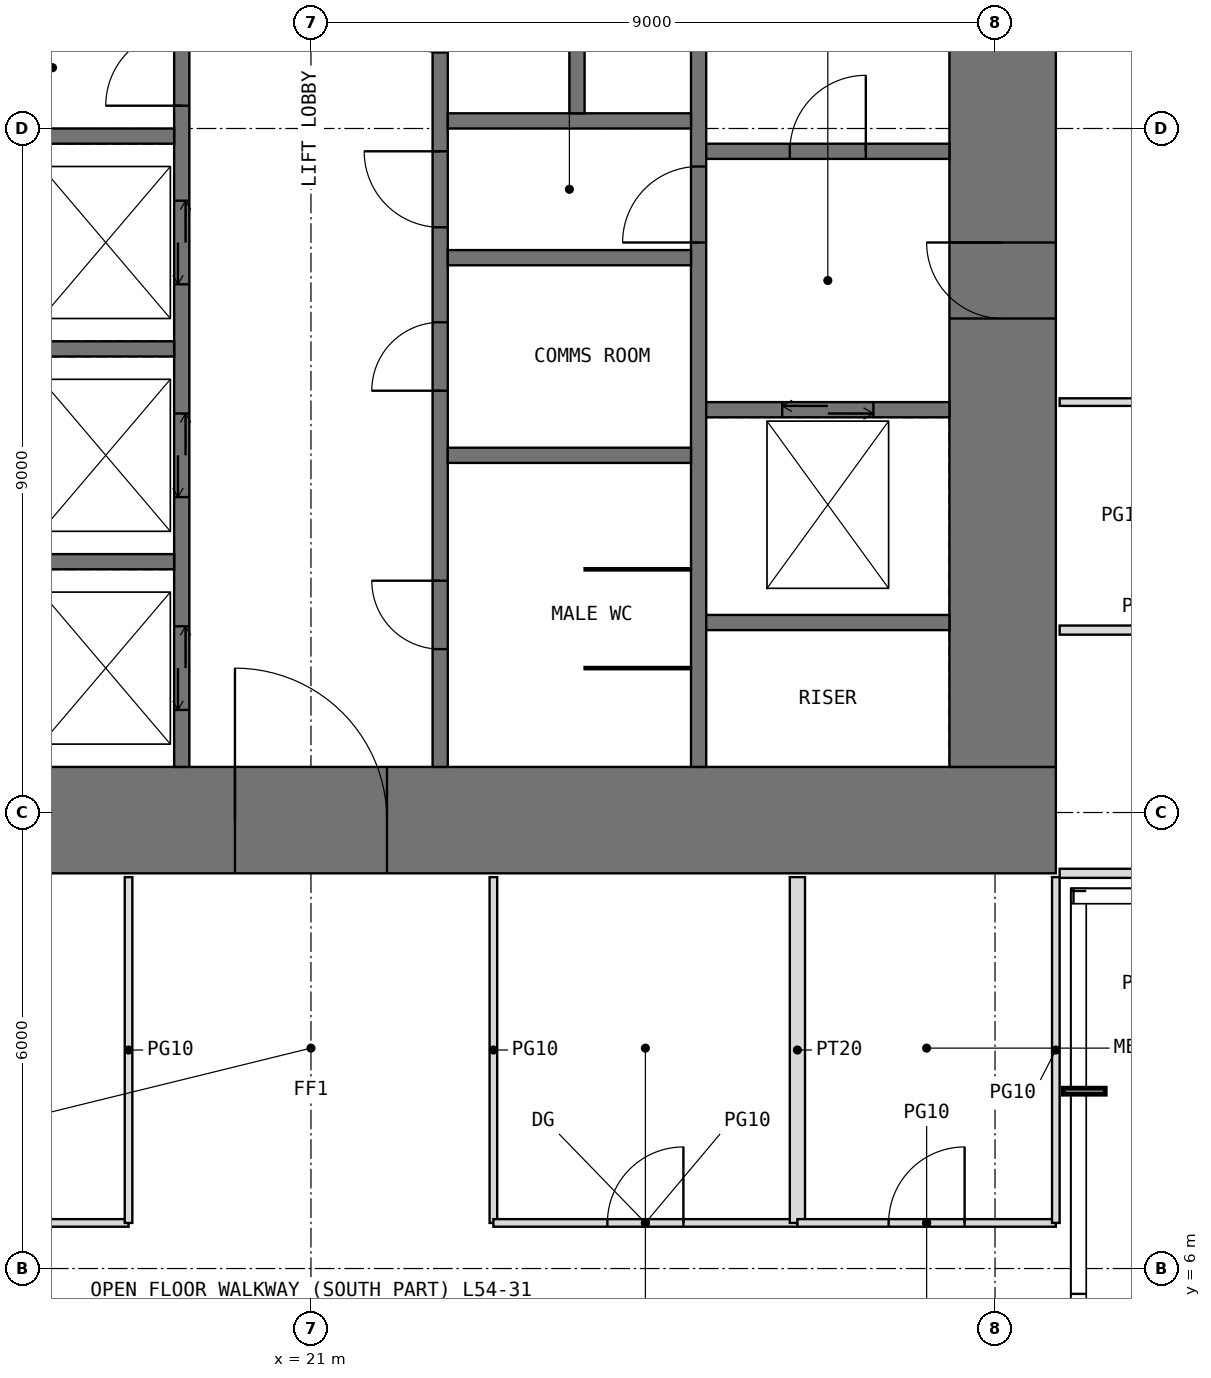
"""IFC4 building model, lengths in metres.
Left out: names, types, materials, properties, quantities, classifications, styles, units other than length and angle.
Written with IfcOpenShell. Run it as: python <this file> out.ifc"""

import sys

from ifc_helpers import new_model, si_unit, direction, frame, frame_2d, origin, place, context, subcontext, project, spatial, rectangle, extrude, element, fill, save


model = new_model("IFC4")
c1 = context("Model", 3, precision=1e-05, world=origin(), true_north=direction((0.0, 1.0)))
c2 = subcontext(c1, "Body", "Model", "MODEL_VIEW")
j1 = project(units=[si_unit("LENGTHUNIT", "METRE"), si_unit("PLANEANGLEUNIT", "RADIAN")], contexts=[c1])
p1 = place(None, origin())
s1 = spatial("IfcSite", under=j1, at=p1, CompositionType="ELEMENT")
p2 = place(p1, origin())
s2 = spatial("IfcBuilding", under=s1, at=p2, CompositionType="ELEMENT")
p3 = place(p2, frame((0.0, 0.0, 226.5)))
s3 = spatial("IfcBuildingStorey", under=s2, at=p3, CompositionType="ELEMENT", Elevation=226.5)
p4 = place(p3, frame((11.2, 11.9, -0.05), z_axis=(0.0, 0.0, 1.0), x_axis=(1.0, 0.0, 0.0)))
e1 = element("IfcWall", 1, at=p4, inside=s3, PredefinedType="SHEAR", context=c2, shape_type="SweptSolid", body=[
    extrude(rectangle(XDim=19.6, YDim=1.4, at=frame_2d((9.8, 0.0))), origin(), (0.0, 0.0, 1.0), 4.0),
])
p5 = place(p4, frame((8.8, 0.0, 0.05)))
e2 = element("IfcOpeningElement", 2, at=p5, cuts=e1, PredefinedType="OPENING", context=c2, shape_type="SweptSolid", body=[
    extrude(rectangle(XDim=2.0, YDim=2.2, at=frame_2d((1.0, 1.1))), frame((0.0, 0.71, 0.0), z_axis=(0.0, -1.0, 0.0), x_axis=(1.0, 0.0, 0.0)), (0.0, 0.0, 1.0), 1.42),
])
p6 = place(p3, frame((30.1, 12.6, -0.05), z_axis=(0.0, 0.0, 1.0), x_axis=(0.0, 1.0, 0.0)))
e3 = element("IfcWall", 3, at=p6, inside=s3, PredefinedType="SHEAR", context=c2, shape_type="SweptSolid", body=[
    extrude(rectangle(XDim=16.8, YDim=1.4, at=frame_2d((8.4, 0.0))), origin(), (0.0, 0.0, 1.0), 4.0),
])
p7 = place(p6, frame((5.9, 0.0, 0.05)))
e4 = element("IfcOpeningElement", 4, at=p7, cuts=e3, PredefinedType="OPENING", context=c2, shape_type="SweptSolid", body=[
    extrude(rectangle(XDim=1.0, YDim=2.2, at=frame_2d((0.5, 1.1))), frame((0.0, 0.71, 0.0), z_axis=(0.0, -1.0, 0.0), x_axis=(1.0, 0.0, 0.0)), (0.0, 0.0, 1.0), 1.42),
])
p8 = place(p3, frame((19.3, 12.6, -0.05), z_axis=(0.0, 0.0, 1.0), x_axis=(0.0, 1.0, 0.0)))
e5 = element("IfcWall", 5, at=p8, inside=s3, PredefinedType="SHEAR", context=c2, shape_type="SweptSolid", body=[
    extrude(rectangle(XDim=16.8, YDim=0.2, at=frame_2d((8.4, 0.0))), origin(), (0.0, 0.0, 1.0), 4.0),
])
p9 = place(p8, frame((8.7, 0.0, 0.05)))
e6 = element("IfcOpeningElement", 6, at=p9, cuts=e5, PredefinedType="OPENING", context=c2, shape_type="SweptSolid", body=[
    extrude(rectangle(XDim=1.0, YDim=2.2, at=frame_2d((0.5, 1.1))), frame((0.0, 0.11, 0.0), z_axis=(0.0, -1.0, 0.0), x_axis=(1.0, 0.0, 0.0)), (0.0, 0.0, 1.0), 0.22),
])
p10 = place(p8, frame((10.85, 0.0, 0.05)))
e7 = element("IfcOpeningElement", 7, at=p10, cuts=e5, PredefinedType="OPENING", context=c2, shape_type="SweptSolid", body=[
    extrude(rectangle(XDim=0.9, YDim=2.2, at=frame_2d((0.45, 1.1))), frame((0.0, 0.11, 0.0), z_axis=(0.0, -1.0, 0.0), x_axis=(1.0, 0.0, 0.0)), (0.0, 0.0, 1.0), 0.22),
])
p11 = place(p8, frame((13.3, 0.0, 0.05)))
e8 = element("IfcOpeningElement", 8, at=p11, cuts=e5, PredefinedType="OPENING", context=c2, shape_type="SweptSolid", body=[
    extrude(rectangle(XDim=1.0, YDim=2.2, at=frame_2d((0.5, 1.1))), frame((0.0, 0.11, 0.0), z_axis=(0.0, -1.0, 0.0), x_axis=(1.0, 0.0, 0.0)), (0.0, 0.0, 1.0), 0.22),
])
p12 = place(p8, frame((15.55, 0.0, 0.05)))
e9 = element("IfcOpeningElement", 9, at=p12, cuts=e5, PredefinedType="OPENING", context=c2, shape_type="SweptSolid", body=[
    extrude(rectangle(XDim=0.9, YDim=2.2, at=frame_2d((0.45, 1.1))), frame((0.0, 0.11, 0.0), z_axis=(0.0, -1.0, 0.0), x_axis=(1.0, 0.0, 0.0)), (0.0, 0.0, 1.0), 0.22),
])
p13 = place(p8, frame((0.75, 0.0, 0.05)))
e10 = element("IfcOpeningElement", 10, at=p13, cuts=e5, PredefinedType="OPENING", context=c2, shape_type="SweptSolid", body=[
    extrude(rectangle(XDim=1.1, YDim=2.2, at=frame_2d((0.55, 1.1))), frame((0.0, 0.11, 0.0), z_axis=(0.0, -1.0, 0.0), x_axis=(1.0, 0.0, 0.0)), (0.0, 0.0, 1.0), 0.22),
])
p14 = place(p8, frame((3.55, 0.0, 0.05)))
e11 = element("IfcOpeningElement", 11, at=p14, cuts=e5, PredefinedType="OPENING", context=c2, shape_type="SweptSolid", body=[
    extrude(rectangle(XDim=1.1, YDim=2.2, at=frame_2d((0.55, 1.1))), frame((0.0, 0.11, 0.0), z_axis=(0.0, -1.0, 0.0), x_axis=(1.0, 0.0, 0.0)), (0.0, 0.0, 1.0), 0.22),
])
p15 = place(p8, frame((6.35, 0.0, 0.05)))
e12 = element("IfcOpeningElement", 12, at=p15, cuts=e5, PredefinedType="OPENING", context=c2, shape_type="SweptSolid", body=[
    extrude(rectangle(XDim=1.1, YDim=2.2, at=frame_2d((0.55, 1.1))), frame((0.0, 0.11, 0.0), z_axis=(0.0, -1.0, 0.0), x_axis=(1.0, 0.0, 0.0)), (0.0, 0.0, 1.0), 0.22),
])
p16 = place(p3, frame((22.7, 12.6, -0.05), z_axis=(0.0, 0.0, 1.0), x_axis=(0.0, 1.0, 0.0)))
e13 = element("IfcWall", 13, at=p16, inside=s3, PredefinedType="SHEAR", context=c2, shape_type="SweptSolid", body=[
    extrude(rectangle(XDim=16.8, YDim=0.2, at=frame_2d((8.4, 0.0))), origin(), (0.0, 0.0, 1.0), 4.0),
])
p17 = place(p16, frame((7.1, 0.0, 0.05)))
e14 = element("IfcOpeningElement", 14, at=p17, cuts=e13, PredefinedType="OPENING", context=c2, shape_type="SweptSolid", body=[
    extrude(rectangle(XDim=1.0, YDim=2.2, at=frame_2d((0.5, 1.1))), frame((0.0, 0.11, 0.0), z_axis=(0.0, -1.0, 0.0), x_axis=(1.0, 0.0, 0.0)), (0.0, 0.0, 1.0), 0.22),
])
p18 = place(p16, frame((1.55, 0.0, 0.05)))
e15 = element("IfcOpeningElement", 15, at=p18, cuts=e13, PredefinedType="OPENING", context=c2, shape_type="SweptSolid", body=[
    extrude(rectangle(XDim=0.9, YDim=2.2, at=frame_2d((0.45, 1.1))), frame((0.0, 0.11, 0.0), z_axis=(0.0, -1.0, 0.0), x_axis=(1.0, 0.0, 0.0)), (0.0, 0.0, 1.0), 0.22),
])
p19 = place(p16, frame((4.95, 0.0, 0.05)))
e16 = element("IfcOpeningElement", 16, at=p19, cuts=e13, PredefinedType="OPENING", context=c2, shape_type="SweptSolid", body=[
    extrude(rectangle(XDim=0.9, YDim=2.2, at=frame_2d((0.45, 1.1))), frame((0.0, 0.11, 0.0), z_axis=(0.0, -1.0, 0.0), x_axis=(1.0, 0.0, 0.0)), (0.0, 0.0, 1.0), 0.22),
])
p20 = place(p16, frame((9.4, 0.0, 0.05)))
e17 = element("IfcOpeningElement", 17, at=p20, cuts=e13, PredefinedType="OPENING", context=c2, shape_type="SweptSolid", body=[
    extrude(rectangle(XDim=1.0, YDim=2.2, at=frame_2d((0.5, 1.1))), frame((0.0, 0.11, 0.0), z_axis=(0.0, -1.0, 0.0), x_axis=(1.0, 0.0, 0.0)), (0.0, 0.0, 1.0), 0.22),
])
p21 = place(p16, frame((12.2, 0.0, 0.05)))
e18 = element("IfcOpeningElement", 18, at=p21, cuts=e13, PredefinedType="OPENING", context=c2, shape_type="SweptSolid", body=[
    extrude(rectangle(XDim=1.0, YDim=2.2, at=frame_2d((0.5, 1.1))), frame((0.0, 0.11, 0.0), z_axis=(0.0, -1.0, 0.0), x_axis=(1.0, 0.0, 0.0)), (0.0, 0.0, 1.0), 0.22),
])
p22 = place(p3, frame((26.1, 12.6, -0.05), z_axis=(0.0, 0.0, 1.0), x_axis=(0.0, 1.0, 0.0)))
e19 = element("IfcWall", 19, at=p22, inside=s3, PredefinedType="SHEAR", context=c2, shape_type="SweptSolid", body=[
    extrude(rectangle(XDim=16.8, YDim=0.2, at=frame_2d((8.4, 0.0))), origin(), (0.0, 0.0, 1.0), 4.0),
])
p23 = place(p22, frame((6.9, 0.0, 0.05)))
e20 = element("IfcOpeningElement", 20, at=p23, cuts=e19, PredefinedType="OPENING", context=c2, shape_type="SweptSolid", body=[
    extrude(rectangle(XDim=1.0, YDim=2.2, at=frame_2d((0.5, 1.1))), frame((0.0, 0.11, 0.0), z_axis=(0.0, -1.0, 0.0), x_axis=(1.0, 0.0, 0.0)), (0.0, 0.0, 1.0), 0.22),
])
for number, where, z_axis, x_axis in (
    (21, (16.0, 15.3, -0.05), (0.0, 0.0, 1.0), (1.0, 0.0, 0.0)),
    (22, (16.0, 18.1, -0.05), (0.0, 0.0, 1.0), (1.0, 0.0, 0.0)),
    (23, (16.0, 20.9, -0.05), (0.0, 0.0, 1.0), (1.0, 0.0, 0.0)),
    (24, (22.8, 16.7, -0.05), (0.0, 0.0, 1.0), (1.0, 0.0, 0.0)),
    (25, (22.8, 19.3, -0.05), (0.0, 0.0, 1.0), (1.0, 0.0, 0.0)),
    (26, (22.8, 21.1, -0.05), (0.0, 0.0, 1.0), (1.0, 0.0, 0.0)),
    (27, (26.2, 14.5, -0.05), (0.0, 0.0, 1.0), (1.0, 0.0, 0.0)),
):
    element("IfcWall", number, at=place(p3, frame(where, z_axis=z_axis, x_axis=x_axis)), inside=s3, PredefinedType="SHEAR", context=c2, shape_type="SweptSolid", body=[
        extrude(rectangle(XDim=3.2, YDim=0.2, at=frame_2d((1.6, 0.0))), origin(), (0.0, 0.0, 1.0), 4.0),
    ])
p24 = place(p3, frame((26.2, 17.3, -0.05), z_axis=(0.0, 0.0, 1.0), x_axis=(1.0, 0.0, 0.0)))
e28 = element("IfcWall", 28, at=p24, inside=s3, PredefinedType="SHEAR", context=c2, shape_type="SweptSolid", body=[
    extrude(rectangle(XDim=3.2, YDim=0.2, at=frame_2d((1.6, 0.0))), origin(), (0.0, 0.0, 1.0), 4.0),
])
p25 = place(p24, frame((1.0, 0.0, 0.05)))
e29 = element("IfcOpeningElement", 29, at=p25, cuts=e28, PredefinedType="OPENING", context=c2, shape_type="SweptSolid", body=[
    extrude(rectangle(XDim=1.2, YDim=2.2, at=frame_2d((0.6, 1.1))), frame((0.0, 0.11, 0.0), z_axis=(0.0, -1.0, 0.0), x_axis=(1.0, 0.0, 0.0)), (0.0, 0.0, 1.0), 0.22),
])
p26 = place(p3, frame((26.2, 20.7, -0.05), z_axis=(0.0, 0.0, 1.0), x_axis=(1.0, 0.0, 0.0)))
e30 = element("IfcWall", 30, at=p26, inside=s3, PredefinedType="SHEAR", context=c2, shape_type="SweptSolid", body=[
    extrude(rectangle(XDim=3.2, YDim=0.2, at=frame_2d((1.6, 0.0))), origin(), (0.0, 0.0, 1.0), 4.0),
])
p27 = place(p26, frame((1.1, 0.0, 0.05)))
e31 = element("IfcOpeningElement", 31, at=p27, cuts=e30, PredefinedType="OPENING", context=c2, shape_type="SweptSolid", body=[
    extrude(rectangle(XDim=1.0, YDim=2.2, at=frame_2d((0.5, 1.1))), frame((0.0, 0.11, 0.0), z_axis=(0.0, -1.0, 0.0), x_axis=(1.0, 0.0, 0.0)), (0.0, 0.0, 1.0), 0.22),
])
for number, where, z_axis, x_axis in (
    (32, (24.6, 13.9, 0.0), (0.0, 0.0, 1.0), (1.0, 0.0, 0.0)),
    (33, (24.6, 15.2, 0.0), (0.0, 0.0, 1.0), (1.0, 0.0, 0.0)),
):
    element("IfcWall", number, at=place(p3, frame(where, z_axis=z_axis, x_axis=x_axis)), inside=s3, PredefinedType="PARTITIONING", context=c2, shape_type="SweptSolid", body=[
        extrude(rectangle(XDim=1.4, YDim=0.03, at=frame_2d((0.7, 0.0))), origin(), (0.0, 0.0, 1.0), 3.75),
    ])
p28 = place(p3, frame((24.5, 21.2, -0.05), z_axis=(0.0, 0.0, 1.0), x_axis=(0.0, 1.0, 0.0)))
e34 = element("IfcWall", 34, at=p28, inside=s3, PredefinedType="SHEAR", context=c2, shape_type="SweptSolid", body=[
    extrude(rectangle(XDim=2.6, YDim=0.2, at=frame_2d((1.3, 0.0))), origin(), (0.0, 0.0, 1.0), 4.0),
])
p29 = place(p28, frame((0.85, 0.0, 0.05)))
e35 = element("IfcOpeningElement", 35, at=p29, cuts=e34, PredefinedType="OPENING", context=c2, shape_type="SweptSolid", body=[
    extrude(rectangle(XDim=0.9, YDim=2.2, at=frame_2d((0.45, 1.1))), frame((0.0, 0.11, 0.0), z_axis=(0.0, -1.0, 0.0), x_axis=(1.0, 0.0, 0.0)), (0.0, 0.0, 1.0), 0.22),
])
p30 = place(p3, frame((11.2, 6.6, 0.0), z_axis=(0.0, 0.0, 1.0), x_axis=(1.0, 0.0, 0.0)))
e36 = element("IfcWall", 36, at=p30, inside=s3, PredefinedType="PARTITIONING", context=c2, shape_type="SweptSolid", body=[
    extrude(rectangle(XDim=7.4, YDim=0.1, at=frame_2d((3.7, 0.0))), origin(), (0.0, 0.0, 1.0), 3.75),
])
p31 = place(p30, frame((3.2, 0.0, 0.0)))
e37 = element("IfcOpeningElement", 37, at=p31, cuts=e36, PredefinedType="OPENING", context=c2, shape_type="SweptSolid", body=[
    extrude(rectangle(XDim=1.0, YDim=2.4, at=frame_2d((0.5, 1.2))), frame((0.0, 0.06, 0.0), z_axis=(0.0, -1.0, 0.0), x_axis=(1.0, 0.0, 0.0)), (0.0, 0.0, 1.0), 0.12),
])
for number, where, z_axis, x_axis in (
    (38, (18.6, 6.6, 0.0), (0.0, 0.0, 1.0), (0.0, 1.0, 0.0)),
    (39, (23.4, 6.6, 0.0), (0.0, 0.0, 1.0), (0.0, 1.0, 0.0)),
):
    element("IfcWall", number, at=place(p3, frame(where, z_axis=z_axis, x_axis=x_axis)), inside=s3, PredefinedType="PARTITIONING", context=c2, shape_type="SweptSolid", body=[
        extrude(rectangle(XDim=4.55, YDim=0.1, at=frame_2d((2.275, 0.0))), origin(), (0.0, 0.0, 1.0), 3.75),
    ])
p32 = place(p3, frame((23.4, 6.6, 0.0), z_axis=(0.0, 0.0, 1.0), x_axis=(1.0, 0.0, 0.0)))
e40 = element("IfcWall", 40, at=p32, inside=s3, PredefinedType="PARTITIONING", context=c2, shape_type="SweptSolid", body=[
    extrude(rectangle(XDim=4.0, YDim=0.1, at=frame_2d((2.0, 0.0))), origin(), (0.0, 0.0, 1.0), 3.75),
])
p33 = place(p32, frame((1.5, 0.0, 0.0)))
e41 = element("IfcOpeningElement", 41, at=p33, cuts=e40, PredefinedType="OPENING", context=c2, shape_type="SweptSolid", body=[
    extrude(rectangle(XDim=1.0, YDim=2.4, at=frame_2d((0.5, 1.2))), frame((0.0, 0.06, 0.0), z_axis=(0.0, -1.0, 0.0), x_axis=(1.0, 0.0, 0.0)), (0.0, 0.0, 1.0), 0.12),
])
p34 = place(p3, frame((27.4, 6.6, 0.0), z_axis=(0.0, 0.0, 1.0), x_axis=(0.0, 1.0, 0.0)))
e42 = element("IfcWall", 42, at=p34, inside=s3, PredefinedType="PARTITIONING", context=c2, shape_type="SweptSolid", body=[
    extrude(rectangle(XDim=4.55, YDim=0.2, at=frame_2d((2.275, 0.0))), origin(), (0.0, 0.0, 1.0), 3.75),
])
p35 = place(p3, frame((27.4, 6.6, 0.0), z_axis=(0.0, 0.0, 1.0), x_axis=(1.0, 0.0, 0.0)))
e43 = element("IfcWall", 43, at=p35, inside=s3, PredefinedType="PARTITIONING", context=c2, shape_type="SweptSolid", body=[
    extrude(rectangle(XDim=3.4, YDim=0.1, at=frame_2d((1.7, 0.0))), origin(), (0.0, 0.0, 1.0), 3.75),
])
p36 = place(p35, frame((1.2, 0.0, 0.0)))
e44 = element("IfcOpeningElement", 44, at=p36, cuts=e43, PredefinedType="OPENING", context=c2, shape_type="SweptSolid", body=[
    extrude(rectangle(XDim=1.0, YDim=2.4, at=frame_2d((0.5, 1.2))), frame((0.0, 0.06, 0.0), z_axis=(0.0, -1.0, 0.0), x_axis=(1.0, 0.0, 0.0)), (0.0, 0.0, 1.0), 0.12),
])
p37 = place(p3, frame((30.8, 6.6, 0.0), z_axis=(0.0, 0.0, 1.0), x_axis=(0.0, 1.0, 0.0)))
e45 = element("IfcWall", 45, at=p37, inside=s3, PredefinedType="PARTITIONING", context=c2, shape_type="SweptSolid", body=[
    extrude(rectangle(XDim=4.55, YDim=0.1, at=frame_2d((2.275, 0.0))), origin(), (0.0, 0.0, 1.0), 3.75),
])
for number, where, z_axis, x_axis in (
    (46, (30.85, 11.2, 0.0), (0.0, 0.0, 1.0), (1.0, 0.0, 0.0)),
    (47, (30.85, 14.4, 0.0), (0.0, 0.0, 1.0), (1.0, 0.0, 0.0)),
):
    element("IfcWall", number, at=place(p3, frame(where, z_axis=z_axis, x_axis=x_axis)), inside=s3, PredefinedType="PARTITIONING", context=c2, shape_type="SweptSolid", body=[
        extrude(rectangle(XDim=2.25, YDim=0.12, at=frame_2d((1.125, 0.0))), origin(), (0.0, 0.0, 1.0), 3.75),
    ])
p38 = place(p3, frame((30.85, 17.4, 0.0), z_axis=(0.0, 0.0, 1.0), x_axis=(1.0, 0.0, 0.0)))
e48 = element("IfcWall", 48, at=p38, inside=s3, PredefinedType="PARTITIONING", context=c2, shape_type="SweptSolid", body=[
    extrude(rectangle(XDim=2.75, YDim=0.1, at=frame_2d((1.375, 0.0))), origin(), (0.0, 0.0, 1.0), 3.75),
])
p39 = place(p5, origin())
e49 = element("IfcDoor", 49, at=p39, inside=s3, OperationType="DOUBLE_DOOR_SINGLE_SWING", PredefinedType="DOOR", context=c2, shape_type="SweptSolid", body=[
    extrude(rectangle(XDim=2.0, YDim=2.2, at=frame_2d((1.0, 1.1))), frame((0.0, 0.025, 0.0), z_axis=(0.0, -1.0, 0.0), x_axis=(1.0, 0.0, 0.0)), (0.0, 0.0, 1.0), 0.05),
])
fill(e2, e49)
p40 = place(p7, origin())
e50 = element("IfcDoor", 50, at=p40, inside=s3, OperationType="SINGLE_SWING_RIGHT", PredefinedType="DOOR", context=c2, shape_type="SweptSolid", body=[
    extrude(rectangle(XDim=1.0, YDim=2.2, at=frame_2d((0.5, 1.1))), frame((0.0, 0.025, 0.0), z_axis=(0.0, -1.0, 0.0), x_axis=(1.0, 0.0, 0.0)), (0.0, 0.0, 1.0), 0.05),
])
fill(e4, e50)
p41 = place(p27, origin())
e51 = element("IfcDoor", 51, at=p41, inside=s3, OperationType="SINGLE_SWING_RIGHT", PredefinedType="DOOR", context=c2, shape_type="SweptSolid", body=[
    extrude(rectangle(XDim=1.0, YDim=2.2, at=frame_2d((0.5, 1.1))), frame((0.0, 0.025, 0.0), z_axis=(0.0, -1.0, 0.0), x_axis=(1.0, 0.0, 0.0)), (0.0, 0.0, 1.0), 0.05),
])
fill(e31, e51)
p42 = place(p23, origin())
e52 = element("IfcDoor", 52, at=p42, inside=s3, OperationType="SINGLE_SWING_LEFT", PredefinedType="DOOR", context=c2, shape_type="SweptSolid", body=[
    extrude(rectangle(XDim=1.0, YDim=2.2, at=frame_2d((0.5, 1.1))), frame((0.0, 0.025, 0.0), z_axis=(0.0, -1.0, 0.0), x_axis=(1.0, 0.0, 0.0)), (0.0, 0.0, 1.0), 0.05),
])
fill(e20, e52)
p43 = place(p9, origin())
e53 = element("IfcDoor", 53, at=p43, inside=s3, OperationType="SINGLE_SWING_LEFT", PredefinedType="DOOR", context=c2, shape_type="SweptSolid", body=[
    extrude(rectangle(XDim=1.0, YDim=2.2, at=frame_2d((0.5, 1.1))), frame((0.0, 0.025, 0.0), z_axis=(0.0, -1.0, 0.0), x_axis=(1.0, 0.0, 0.0)), (0.0, 0.0, 1.0), 0.05),
])
fill(e6, e53)
p44 = place(p17, origin())
e54 = element("IfcDoor", 54, at=p44, inside=s3, OperationType="SINGLE_SWING_RIGHT", PredefinedType="DOOR", context=c2, shape_type="SweptSolid", body=[
    extrude(rectangle(XDim=1.0, YDim=2.2, at=frame_2d((0.5, 1.1))), frame((0.0, 0.025, 0.0), z_axis=(0.0, -1.0, 0.0), x_axis=(1.0, 0.0, 0.0)), (0.0, 0.0, 1.0), 0.05),
])
fill(e14, e54)
p45 = place(p18, origin())
e55 = element("IfcDoor", 55, at=p45, inside=s3, OperationType="SINGLE_SWING_RIGHT", PredefinedType="DOOR", context=c2, shape_type="SweptSolid", body=[
    extrude(rectangle(XDim=0.9, YDim=2.2, at=frame_2d((0.45, 1.1))), frame((0.0, 0.025, 0.0), z_axis=(0.0, -1.0, 0.0), x_axis=(1.0, 0.0, 0.0)), (0.0, 0.0, 1.0), 0.05),
])
fill(e15, e55)
p46 = place(p19, origin())
e56 = element("IfcDoor", 56, at=p46, inside=s3, OperationType="SINGLE_SWING_LEFT", PredefinedType="DOOR", context=c2, shape_type="SweptSolid", body=[
    extrude(rectangle(XDim=0.9, YDim=2.2, at=frame_2d((0.45, 1.1))), frame((0.0, 0.025, 0.0), z_axis=(0.0, -1.0, 0.0), x_axis=(1.0, 0.0, 0.0)), (0.0, 0.0, 1.0), 0.05),
])
fill(e16, e56)
p47 = place(p33, origin())
e57 = element("IfcDoor", 57, at=p47, inside=s3, OperationType="SINGLE_SWING_RIGHT", PredefinedType="DOOR", context=c2, shape_type="SweptSolid", body=[
    extrude(rectangle(XDim=1.0, YDim=2.4, at=frame_2d((0.5, 1.2))), frame((0.0, 0.025, 0.0), z_axis=(0.0, -1.0, 0.0), x_axis=(1.0, 0.0, 0.0)), (0.0, 0.0, 1.0), 0.05),
])
fill(e41, e57)
p48 = place(p36, origin())
e58 = element("IfcDoor", 58, at=p48, inside=s3, OperationType="SINGLE_SWING_RIGHT", PredefinedType="DOOR", context=c2, shape_type="SweptSolid", body=[
    extrude(rectangle(XDim=1.0, YDim=2.4, at=frame_2d((0.5, 1.2))), frame((0.0, 0.025, 0.0), z_axis=(0.0, -1.0, 0.0), x_axis=(1.0, 0.0, 0.0)), (0.0, 0.0, 1.0), 0.05),
])
fill(e44, e58)
p49 = place(p13, origin())
e59 = element("IfcDoor", 59, at=p49, inside=s3, OperationType="DOUBLE_DOOR_SLIDING", PredefinedType="DOOR", context=c2, shape_type="SweptSolid", body=[
    extrude(rectangle(XDim=1.1, YDim=2.2, at=frame_2d((0.55, 1.1))), frame((0.0, 0.025, 0.0), z_axis=(0.0, -1.0, 0.0), x_axis=(1.0, 0.0, 0.0)), (0.0, 0.0, 1.0), 0.05),
])
fill(e10, e59)
p50 = place(p14, origin())
e60 = element("IfcDoor", 60, at=p50, inside=s3, OperationType="DOUBLE_DOOR_SLIDING", PredefinedType="DOOR", context=c2, shape_type="SweptSolid", body=[
    extrude(rectangle(XDim=1.1, YDim=2.2, at=frame_2d((0.55, 1.1))), frame((0.0, 0.025, 0.0), z_axis=(0.0, -1.0, 0.0), x_axis=(1.0, 0.0, 0.0)), (0.0, 0.0, 1.0), 0.05),
])
fill(e11, e60)
p51 = place(p15, origin())
e61 = element("IfcDoor", 61, at=p51, inside=s3, OperationType="DOUBLE_DOOR_SLIDING", PredefinedType="DOOR", context=c2, shape_type="SweptSolid", body=[
    extrude(rectangle(XDim=1.1, YDim=2.2, at=frame_2d((0.55, 1.1))), frame((0.0, 0.025, 0.0), z_axis=(0.0, -1.0, 0.0), x_axis=(1.0, 0.0, 0.0)), (0.0, 0.0, 1.0), 0.05),
])
fill(e12, e61)
p52 = place(p25, origin())
e62 = element("IfcDoor", 62, at=p52, inside=s3, OperationType="DOUBLE_DOOR_SLIDING", PredefinedType="DOOR", context=c2, shape_type="SweptSolid", body=[
    extrude(rectangle(XDim=1.2, YDim=2.2, at=frame_2d((0.6, 1.1))), frame((0.0, 0.025, 0.0), z_axis=(0.0, -1.0, 0.0), x_axis=(1.0, 0.0, 0.0)), (0.0, 0.0, 1.0), 0.05),
])
fill(e29, e62)
save(model, sys.argv[1])
